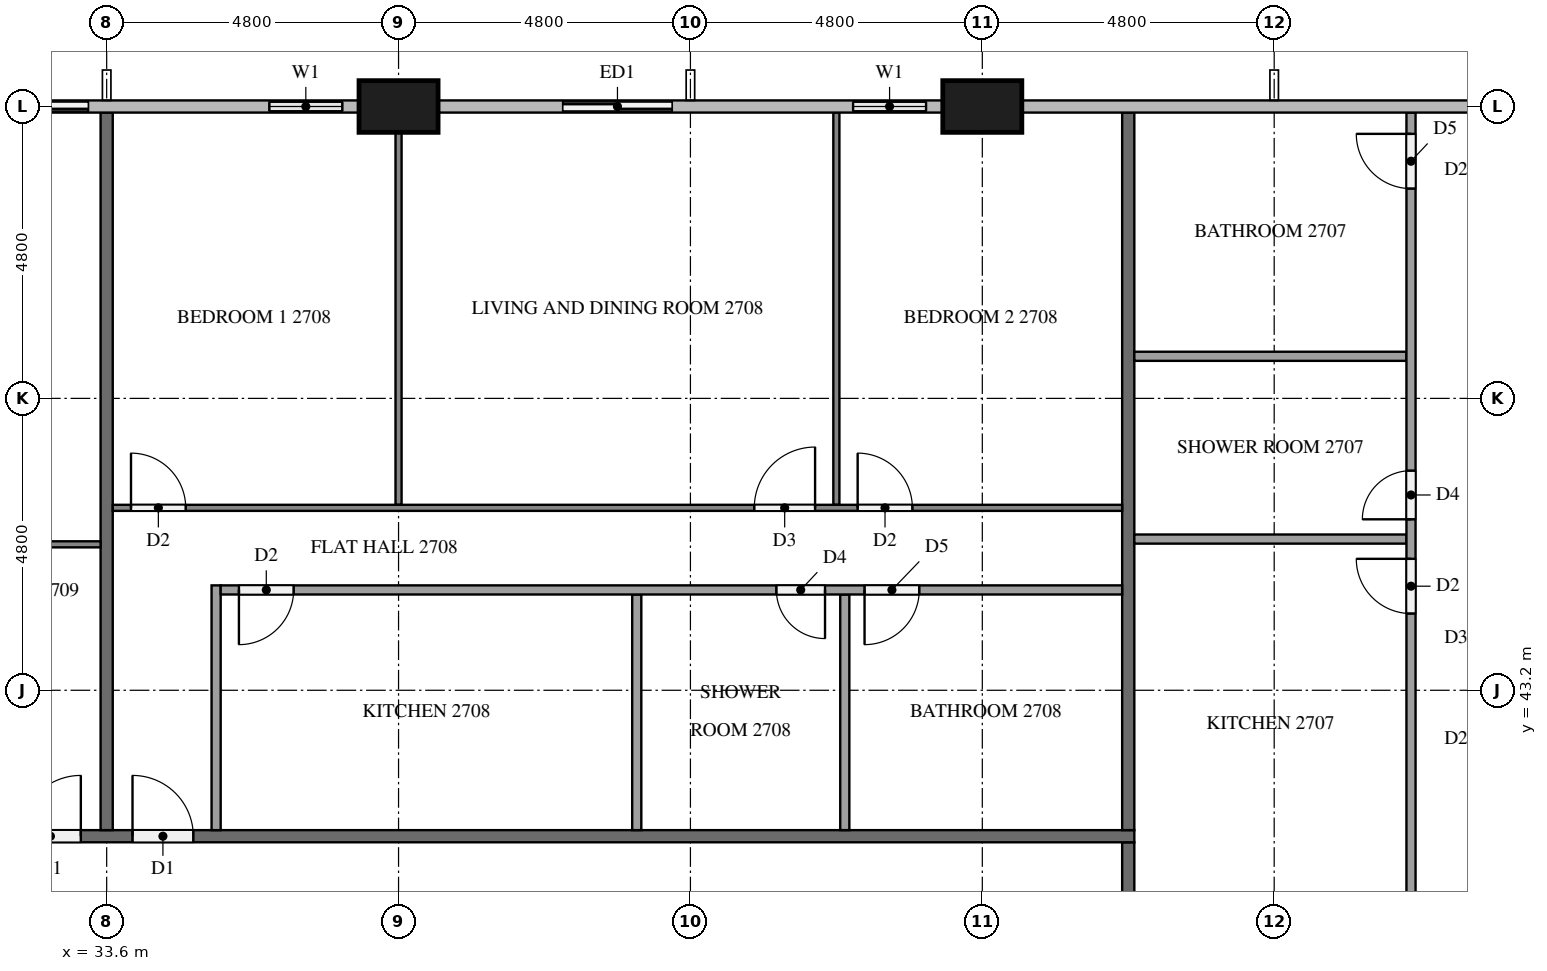
"""IFC4 building model, lengths in metres.
Left out: names, types, materials, properties, quantities, classifications, styles, units other than length and angle.
Written with IfcOpenShell. Run it as: python <this file> out.ifc"""

import sys

from ifc_helpers import new_model, si_unit, direction, frame, frame_2d, origin, origin_2d, place, context, subcontext, project, spatial, rectangle, extrude, element, fill, save


model = new_model("IFC4")
c1 = context("Model", 3, precision=1e-05, world=origin(), true_north=direction((0.0, 1.0)))
c2 = subcontext(c1, "Body", "Model", "MODEL_VIEW")
j1 = project(units=[si_unit("LENGTHUNIT", "METRE"), si_unit("PLANEANGLEUNIT", "RADIAN")], contexts=[c1])
p1 = place(None, origin())
s1 = spatial("IfcSite", under=j1, at=p1, CompositionType="ELEMENT")
p2 = place(p1, origin())
s2 = spatial("IfcBuilding", under=s1, at=p2, CompositionType="ELEMENT")
p3 = place(p2, frame((0.0, 0.0, 106.7)))
s3 = spatial("IfcBuildingStorey", under=s2, at=p3, CompositionType="ELEMENT", Elevation=106.7)
for number, where, z_axis, x_axis in (
    (1, (48.0, 52.8, 0.0), (0.0, 0.0, 1.0), (1.0, 0.0, 0.0)),
    (2, (38.4, 52.8, 0.0), (0.0, 0.0, 1.0), (1.0, 0.0, 0.0)),
):
    element("IfcColumn", number, at=place(p3, frame(where, z_axis=z_axis, x_axis=x_axis)), inside=s3, PredefinedType="COLUMN", context=c2, shape_type="SweptSolid", body=[
        extrude(rectangle(XDim=1.3, YDim=0.85, at=origin_2d()), origin(), (0.0, 0.0, 1.0), 3.2),
    ])
p4 = place(p3, frame((47.35, 52.8, 0.0), z_axis=(0.0, 0.0, 1.0), x_axis=(-1.0, 0.0, 0.0)))
e3 = element("IfcWall", 3, at=p4, inside=s3, PredefinedType="SOLIDWALL", context=c2, shape_type="SweptSolid", body=[
    extrude(rectangle(XDim=1.75, YDim=0.15, at=frame_2d((0.875, 0.0))), origin(), (0.0, 0.0, 1.0), 3.2),
])
p5 = place(p4, frame((0.275, 0.0, 0.9)))
e4 = element("IfcOpeningElement", 4, at=p5, cuts=e3, PredefinedType="OPENING", context=c2, shape_type="SweptSolid", body=[
    extrude(rectangle(XDim=1.2, YDim=1.4, at=frame_2d((0.6, 0.7))), frame((0.0, 0.085, 0.0), z_axis=(0.0, -1.0, 0.0), x_axis=(1.0, 0.0, 0.0)), (0.0, 0.0, 1.0), 0.17),
])
p6 = place(p3, frame((43.2, 52.8, 0.0), z_axis=(0.0, 0.0, 1.0), x_axis=(-1.0, 0.0, 0.0)))
e5 = element("IfcWall", 5, at=p6, inside=s3, PredefinedType="SOLIDWALL", context=c2, shape_type="SweptSolid", body=[
    extrude(rectangle(XDim=2.4, YDim=0.15, at=frame_2d((1.2, 0.0))), origin(), (0.0, 0.0, 1.0), 3.2),
])
p7 = place(p6, frame((0.3, 0.0, 0.0)))
e6 = element("IfcOpeningElement", 6, at=p7, cuts=e5, PredefinedType="OPENING", context=c2, shape_type="SweptSolid", body=[
    extrude(rectangle(XDim=1.8, YDim=2.4, at=frame_2d((0.9, 1.2))), frame((0.0, 0.085, 0.0), z_axis=(0.0, -1.0, 0.0), x_axis=(1.0, 0.0, 0.0)), (0.0, 0.0, 1.0), 0.17),
])
p8 = place(p3, frame((37.75, 52.8, 0.0), z_axis=(0.0, 0.0, 1.0), x_axis=(-1.0, 0.0, 0.0)))
e7 = element("IfcWall", 7, at=p8, inside=s3, PredefinedType="SOLIDWALL", context=c2, shape_type="SweptSolid", body=[
    extrude(rectangle(XDim=1.75, YDim=0.15, at=frame_2d((0.875, 0.0))), origin(), (0.0, 0.0, 1.0), 3.2),
])
p9 = place(p8, frame((0.275, 0.0, 0.9)))
e8 = element("IfcOpeningElement", 8, at=p9, cuts=e7, PredefinedType="OPENING", context=c2, shape_type="SweptSolid", body=[
    extrude(rectangle(XDim=1.2, YDim=1.4, at=frame_2d((0.6, 0.7))), frame((0.0, 0.085, 0.0), z_axis=(0.0, -1.0, 0.0), x_axis=(1.0, 0.0, 0.0)), (0.0, 0.0, 1.0), 0.17),
])
p10 = place(p3, frame((33.6, 52.8, 0.0), z_axis=(0.0, 0.0, 1.0), x_axis=(-1.0, 0.0, 0.0)))
e9 = element("IfcWall", 9, at=p10, inside=s3, PredefinedType="SOLIDWALL", context=c2, shape_type="SweptSolid", body=[
    extrude(rectangle(XDim=2.4, YDim=0.15, at=frame_2d((1.2, 0.0))), origin(), (0.0, 0.0, 1.0), 3.2),
])
p11 = place(p10, frame((0.3, 0.0, 0.0)))
e10 = element("IfcOpeningElement", 10, at=p11, cuts=e9, PredefinedType="OPENING", context=c2, shape_type="SweptSolid", body=[
    extrude(rectangle(XDim=1.8, YDim=2.4, at=frame_2d((0.9, 1.2))), frame((0.0, 0.085, 0.0), z_axis=(0.0, -1.0, 0.0), x_axis=(1.0, 0.0, 0.0)), (0.0, 0.0, 1.0), 0.17),
])
p12 = place(p3, frame((50.4, 40.7, 0.0), z_axis=(0.0, 0.0, 1.0), x_axis=(0.0, -1.0, 0.0)))
e11 = element("IfcWall", 11, at=p12, inside=s3, PredefinedType="PARTITIONING", context=c2, shape_type="SweptSolid", body=[
    extrude(rectangle(XDim=2.8, YDim=0.2, at=frame_2d((1.4, 0.0))), origin(), (0.0, 0.0, 1.0), 3.2),
])
p13 = place(p12, frame((1.475, 0.0, 0.0)))
e12 = element("IfcOpeningElement", 12, at=p13, cuts=e11, PredefinedType="OPENING", context=c2, shape_type="SweptSolid", body=[
    extrude(rectangle(XDim=1.0, YDim=2.1, at=frame_2d((0.5, 1.05))), frame((0.0, 0.11, 0.0), z_axis=(0.0, -1.0, 0.0), x_axis=(1.0, 0.0, 0.0)), (0.0, 0.0, 1.0), 0.22),
])
p14 = place(p3, frame((11.9, 40.8, 0.0), z_axis=(0.0, 0.0, 1.0), x_axis=(1.0, 0.0, 0.0)))
e13 = element("IfcWall", 13, at=p14, inside=s3, PredefinedType="PARTITIONING", context=c2, shape_type="SweptSolid", body=[
    extrude(rectangle(XDim=38.6, YDim=0.2, at=frame_2d((19.3, 0.0))), origin(), (0.0, 0.0, 1.0), 3.2),
])
p15 = place(p14, frame((22.125, 0.0, 0.0)))
e14 = element("IfcOpeningElement", 14, at=p15, cuts=e13, PredefinedType="OPENING", context=c2, shape_type="SweptSolid", body=[
    extrude(rectangle(XDim=1.0, YDim=2.1, at=frame_2d((0.5, 1.05))), frame((0.0, 0.11, 0.0), z_axis=(0.0, -1.0, 0.0), x_axis=(1.0, 0.0, 0.0)), (0.0, 0.0, 1.0), 0.22),
])
p16 = place(p14, frame((20.275, 0.0, 0.0)))
e15 = element("IfcOpeningElement", 15, at=p16, cuts=e13, PredefinedType="OPENING", context=c2, shape_type="SweptSolid", body=[
    extrude(rectangle(XDim=1.0, YDim=2.1, at=frame_2d((0.5, 1.05))), frame((0.0, 0.11, 0.0), z_axis=(0.0, -1.0, 0.0), x_axis=(1.0, 0.0, 0.0)), (0.0, 0.0, 1.0), 0.22),
])
p17 = place(p14, frame((0.525, 0.0, 0.0)))
e16 = element("IfcOpeningElement", 16, at=p17, cuts=e13, PredefinedType="OPENING", context=c2, shape_type="SweptSolid", body=[
    extrude(rectangle(XDim=1.0, YDim=2.1, at=frame_2d((0.5, 1.05))), frame((0.0, 0.11, 0.0), z_axis=(0.0, -1.0, 0.0), x_axis=(1.0, 0.0, 0.0)), (0.0, 0.0, 1.0), 0.22),
])
for number, where, z_axis, x_axis in (
    (17, (50.4, 40.9, 0.0), (0.0, 0.0, 1.0), (0.0, 1.0, 0.0)),
    (18, (33.6, 52.7, 0.0), (0.0, 0.0, 1.0), (0.0, -1.0, 0.0)),
):
    element("IfcWall", number, at=place(p3, frame(where, z_axis=z_axis, x_axis=x_axis)), inside=s3, PredefinedType="PARTITIONING", context=c2, shape_type="SweptSolid", body=[
        extrude(rectangle(XDim=11.8, YDim=0.2, at=frame_2d((5.9, 0.0))), origin(), (0.0, 0.0, 1.0), 3.2),
    ])
for number, where, z_axis, x_axis in (
    (19, (50.5, 45.687, 0.0), (0.0, 0.0, 1.0), (1.0, 0.0, 0.0)),
    (20, (50.5, 48.692, 0.0), (0.0, 0.0, 1.0), (1.0, 0.0, 0.0)),
):
    element("IfcWall", number, at=place(p3, frame(where, z_axis=z_axis, x_axis=x_axis)), inside=s3, PredefinedType="PARTITIONING", context=c2, shape_type="SweptSolid", body=[
        extrude(rectangle(XDim=4.475, YDim=0.15, at=frame_2d((2.238, 0.0))), origin(), (0.0, 0.0, 1.0), 3.2),
    ])
p18 = place(p3, frame((55.05, 39.675, 0.0), z_axis=(0.0, 0.0, 1.0), x_axis=(0.0, 1.0, 0.0)))
e21 = element("IfcWall", 21, at=p18, inside=s3, PredefinedType="PARTITIONING", context=c2, shape_type="SweptSolid", body=[
    extrude(rectangle(XDim=13.025, YDim=0.15, at=frame_2d((6.512, 0.0))), origin(), (0.0, 0.0, 1.0), 3.2),
])
p19 = place(p18, frame((4.787, 0.0, 0.0)))
e22 = element("IfcOpeningElement", 22, at=p19, cuts=e21, PredefinedType="OPENING", context=c2, shape_type="SweptSolid", body=[
    extrude(rectangle(XDim=0.9, YDim=2.1, at=frame_2d((0.45, 1.05))), frame((0.0, 0.085, 0.0), z_axis=(0.0, -1.0, 0.0), x_axis=(1.0, 0.0, 0.0)), (0.0, 0.0, 1.0), 0.17),
])
p20 = place(p18, frame((6.336, 0.0, 0.0)))
e23 = element("IfcOpeningElement", 23, at=p20, cuts=e21, PredefinedType="OPENING", context=c2, shape_type="SweptSolid", body=[
    extrude(rectangle(XDim=0.8, YDim=2.1, at=frame_2d((0.4, 1.05))), frame((0.0, 0.085, 0.0), z_axis=(0.0, -1.0, 0.0), x_axis=(1.0, 0.0, 0.0)), (0.0, 0.0, 1.0), 0.17),
])
p21 = place(p18, frame((11.775, 0.0, 0.0)))
e24 = element("IfcOpeningElement", 24, at=p21, cuts=e21, PredefinedType="OPENING", context=c2, shape_type="SweptSolid", body=[
    extrude(rectangle(XDim=0.9, YDim=2.1, at=frame_2d((0.45, 1.05))), frame((0.0, 0.085, 0.0), z_axis=(0.0, -1.0, 0.0), x_axis=(1.0, 0.0, 0.0)), (0.0, 0.0, 1.0), 0.17),
])
p22 = place(p3, frame((38.4, 46.25, 0.0), z_axis=(0.0, 0.0, 1.0), x_axis=(0.0, 1.0, 0.0)))
e25 = element("IfcWall", 25, at=p22, inside=s3, PredefinedType="PARTITIONING", context=c2, shape_type="SweptSolid", body=[
    extrude(rectangle(XDim=6.125, YDim=0.1, at=frame_2d((3.062, 0.0))), origin(), (0.0, 0.0, 1.0), 3.2),
])
p23 = place(p3, frame((45.6, 46.25, 0.0), z_axis=(0.0, 0.0, 1.0), x_axis=(0.0, 1.0, 0.0)))
e26 = element("IfcWall", 26, at=p23, inside=s3, PredefinedType="PARTITIONING", context=c2, shape_type="SweptSolid", body=[
    extrude(rectangle(XDim=6.45, YDim=0.1, at=frame_2d((3.225, 0.0))), origin(), (0.0, 0.0, 1.0), 3.2),
])
p24 = place(p3, frame((33.7, 46.2, 0.0), z_axis=(0.0, 0.0, 1.0), x_axis=(1.0, 0.0, 0.0)))
e27 = element("IfcWall", 27, at=p24, inside=s3, PredefinedType="PARTITIONING", context=c2, shape_type="SweptSolid", body=[
    extrude(rectangle(XDim=16.6, YDim=0.1, at=frame_2d((8.3, 0.0))), origin(), (0.0, 0.0, 1.0), 3.2),
])
p25 = place(p24, frame((0.3, 0.0, 0.0)))
e28 = element("IfcOpeningElement", 28, at=p25, cuts=e27, PredefinedType="OPENING", context=c2, shape_type="SweptSolid", body=[
    extrude(rectangle(XDim=0.9, YDim=2.1, at=frame_2d((0.45, 1.05))), frame((0.0, 0.06, 0.0), z_axis=(0.0, -1.0, 0.0), x_axis=(1.0, 0.0, 0.0)), (0.0, 0.0, 1.0), 0.12),
])
p26 = place(p24, frame((10.55, 0.0, 0.0)))
e29 = element("IfcOpeningElement", 29, at=p26, cuts=e27, PredefinedType="OPENING", context=c2, shape_type="SweptSolid", body=[
    extrude(rectangle(XDim=1.0, YDim=2.1, at=frame_2d((0.5, 1.05))), frame((0.0, 0.06, 0.0), z_axis=(0.0, -1.0, 0.0), x_axis=(1.0, 0.0, 0.0)), (0.0, 0.0, 1.0), 0.12),
])
p27 = place(p24, frame((12.25, 0.0, 0.0)))
e30 = element("IfcOpeningElement", 30, at=p27, cuts=e27, PredefinedType="OPENING", context=c2, shape_type="SweptSolid", body=[
    extrude(rectangle(XDim=0.9, YDim=2.1, at=frame_2d((0.45, 1.05))), frame((0.0, 0.06, 0.0), z_axis=(0.0, -1.0, 0.0), x_axis=(1.0, 0.0, 0.0)), (0.0, 0.0, 1.0), 0.12),
])
for number, where, z_axis, x_axis in (
    (31, (42.317, 40.9, 0.0), (0.0, 0.0, 1.0), (0.0, 1.0, 0.0)),
    (32, (45.739, 40.9, 0.0), (0.0, 0.0, 1.0), (0.0, 1.0, 0.0)),
):
    element("IfcWall", number, at=place(p3, frame(where, z_axis=z_axis, x_axis=x_axis)), inside=s3, PredefinedType="PARTITIONING", context=c2, shape_type="SweptSolid", body=[
        extrude(rectangle(XDim=3.875, YDim=0.15, at=frame_2d((1.938, 0.0))), origin(), (0.0, 0.0, 1.0), 3.2),
    ])
p28 = place(p3, frame((35.4, 40.9, 0.0), z_axis=(0.0, 0.0, 1.0), x_axis=(0.0, 1.0, 0.0)))
e33 = element("IfcWall", 33, at=p28, inside=s3, PredefinedType="PARTITIONING", context=c2, shape_type="SweptSolid", body=[
    extrude(rectangle(XDim=4.025, YDim=0.15, at=frame_2d((2.013, 0.0))), origin(), (0.0, 0.0, 1.0), 3.2),
])
p29 = place(p3, frame((50.3, 44.85, 0.0), z_axis=(0.0, 0.0, 1.0), x_axis=(-1.0, 0.0, 0.0)))
e34 = element("IfcWall", 34, at=p29, inside=s3, PredefinedType="PARTITIONING", context=c2, shape_type="SweptSolid", body=[
    extrude(rectangle(XDim=14.825, YDim=0.15, at=frame_2d((7.413, 0.0))), origin(), (0.0, 0.0, 1.0), 3.2),
])
p30 = place(p29, frame((13.625, 0.0, 0.0)))
e35 = element("IfcOpeningElement", 35, at=p30, cuts=e34, PredefinedType="OPENING", context=c2, shape_type="SweptSolid", body=[
    extrude(rectangle(XDim=0.9, YDim=2.1, at=frame_2d((0.45, 1.05))), frame((0.0, 0.085, 0.0), z_axis=(0.0, -1.0, 0.0), x_axis=(1.0, 0.0, 0.0)), (0.0, 0.0, 1.0), 0.17),
])
p31 = place(p29, frame((4.886, 0.0, 0.0)))
e36 = element("IfcOpeningElement", 36, at=p31, cuts=e34, PredefinedType="OPENING", context=c2, shape_type="SweptSolid", body=[
    extrude(rectangle(XDim=0.8, YDim=2.1, at=frame_2d((0.4, 1.05))), frame((0.0, 0.085, 0.0), z_axis=(0.0, -1.0, 0.0), x_axis=(1.0, 0.0, 0.0)), (0.0, 0.0, 1.0), 0.17),
])
p32 = place(p29, frame((3.336, 0.0, 0.0)))
e37 = element("IfcOpeningElement", 37, at=p32, cuts=e34, PredefinedType="OPENING", context=c2, shape_type="SweptSolid", body=[
    extrude(rectangle(XDim=0.9, YDim=2.1, at=frame_2d((0.45, 1.05))), frame((0.0, 0.085, 0.0), z_axis=(0.0, -1.0, 0.0), x_axis=(1.0, 0.0, 0.0)), (0.0, 0.0, 1.0), 0.17),
])
p33 = place(p3, frame((21.7, 45.6, 0.0), z_axis=(0.0, 0.0, 1.0), x_axis=(1.0, 0.0, 0.0)))
e38 = element("IfcWall", 38, at=p33, inside=s3, PredefinedType="PARTITIONING", context=c2, shape_type="SweptSolid", body=[
    extrude(rectangle(XDim=11.8, YDim=0.1, at=frame_2d((5.9, 0.0))), origin(), (0.0, 0.0, 1.0), 3.2),
])
p34 = place(p33, frame((5.05, 0.0, 0.0)))
e39 = element("IfcOpeningElement", 39, at=p34, cuts=e38, PredefinedType="OPENING", context=c2, shape_type="SweptSolid", body=[
    extrude(rectangle(XDim=1.0, YDim=2.1, at=frame_2d((0.5, 1.05))), frame((0.0, 0.06, 0.0), z_axis=(0.0, -1.0, 0.0), x_axis=(1.0, 0.0, 0.0)), (0.0, 0.0, 1.0), 0.12),
])
p35 = place(p33, frame((3.45, 0.0, 0.0)))
e40 = element("IfcOpeningElement", 40, at=p35, cuts=e38, PredefinedType="OPENING", context=c2, shape_type="SweptSolid", body=[
    extrude(rectangle(XDim=0.9, YDim=2.1, at=frame_2d((0.45, 1.05))), frame((0.0, 0.06, 0.0), z_axis=(0.0, -1.0, 0.0), x_axis=(1.0, 0.0, 0.0)), (0.0, 0.0, 1.0), 0.12),
])
p36 = place(p5, origin())
e41 = element("IfcWindow", 41, at=p36, inside=s3, PartitioningType="SINGLE_PANEL", PredefinedType="WINDOW", context=c2, shape_type="SweptSolid", body=[
    extrude(rectangle(XDim=1.2, YDim=1.4, at=frame_2d((0.6, 0.7))), frame((0.0, 0.03, 0.0), z_axis=(0.0, -1.0, 0.0), x_axis=(1.0, 0.0, 0.0)), (0.0, 0.0, 1.0), 0.06),
])
fill(e4, e41)
p37 = place(p7, origin())
e42 = element("IfcDoor", 42, at=p37, inside=s3, OperationType="SLIDING_TO_RIGHT", PredefinedType="DOOR", context=c2, shape_type="SweptSolid", body=[
    extrude(rectangle(XDim=1.8, YDim=2.4, at=frame_2d((0.9, 1.2))), frame((0.0, 0.025, 0.0), z_axis=(0.0, -1.0, 0.0), x_axis=(1.0, 0.0, 0.0)), (0.0, 0.0, 1.0), 0.05),
])
fill(e6, e42)
p38 = place(p9, origin())
e43 = element("IfcWindow", 43, at=p38, inside=s3, PartitioningType="SINGLE_PANEL", PredefinedType="WINDOW", context=c2, shape_type="SweptSolid", body=[
    extrude(rectangle(XDim=1.2, YDim=1.4, at=frame_2d((0.6, 0.7))), frame((0.0, 0.03, 0.0), z_axis=(0.0, -1.0, 0.0), x_axis=(1.0, 0.0, 0.0)), (0.0, 0.0, 1.0), 0.06),
])
fill(e8, e43)
p39 = place(p11, origin())
e44 = element("IfcDoor", 44, at=p39, inside=s3, OperationType="SLIDING_TO_LEFT", PredefinedType="DOOR", context=c2, shape_type="SweptSolid", body=[
    extrude(rectangle(XDim=1.8, YDim=2.4, at=frame_2d((0.9, 1.2))), frame((0.0, 0.025, 0.0), z_axis=(0.0, -1.0, 0.0), x_axis=(1.0, 0.0, 0.0)), (0.0, 0.0, 1.0), 0.05),
])
fill(e10, e44)
p40 = place(p15, origin())
e45 = element("IfcDoor", 45, at=p40, inside=s3, OperationType="SINGLE_SWING_LEFT", PredefinedType="DOOR", context=c2, shape_type="SweptSolid", body=[
    extrude(rectangle(XDim=1.0, YDim=2.1, at=frame_2d((0.5, 1.05))), frame((0.0, 0.025, 0.0), z_axis=(0.0, -1.0, 0.0), x_axis=(1.0, 0.0, 0.0)), (0.0, 0.0, 1.0), 0.05),
])
fill(e14, e45)
p41 = place(p16, origin())
e46 = element("IfcDoor", 46, at=p41, inside=s3, OperationType="SINGLE_SWING_RIGHT", PredefinedType="DOOR", context=c2, shape_type="SweptSolid", body=[
    extrude(rectangle(XDim=1.0, YDim=2.1, at=frame_2d((0.5, 1.05))), frame((0.0, 0.025, 0.0), z_axis=(0.0, -1.0, 0.0), x_axis=(1.0, 0.0, 0.0)), (0.0, 0.0, 1.0), 0.05),
])
fill(e15, e46)
p42 = place(p19, origin())
e47 = element("IfcDoor", 47, at=p42, inside=s3, OperationType="SINGLE_SWING_RIGHT", PredefinedType="DOOR", context=c2, shape_type="SweptSolid", body=[
    extrude(rectangle(XDim=0.9, YDim=2.1, at=frame_2d((0.45, 1.05))), frame((0.0, 0.025, 0.0), z_axis=(0.0, -1.0, 0.0), x_axis=(1.0, 0.0, 0.0)), (0.0, 0.0, 1.0), 0.05),
])
fill(e22, e47)
p43 = place(p20, origin())
e48 = element("IfcDoor", 48, at=p43, inside=s3, OperationType="SINGLE_SWING_LEFT", PredefinedType="DOOR", context=c2, shape_type="SweptSolid", body=[
    extrude(rectangle(XDim=0.8, YDim=2.1, at=frame_2d((0.4, 1.05))), frame((0.0, 0.025, 0.0), z_axis=(0.0, -1.0, 0.0), x_axis=(1.0, 0.0, 0.0)), (0.0, 0.0, 1.0), 0.05),
])
fill(e23, e48)
p44 = place(p21, origin())
e49 = element("IfcDoor", 49, at=p44, inside=s3, OperationType="SINGLE_SWING_RIGHT", PredefinedType="DOOR", context=c2, shape_type="SweptSolid", body=[
    extrude(rectangle(XDim=0.9, YDim=2.1, at=frame_2d((0.45, 1.05))), frame((0.0, 0.025, 0.0), z_axis=(0.0, -1.0, 0.0), x_axis=(1.0, 0.0, 0.0)), (0.0, 0.0, 1.0), 0.05),
])
fill(e24, e49)
p45 = place(p25, origin())
e50 = element("IfcDoor", 50, at=p45, inside=s3, OperationType="SINGLE_SWING_LEFT", PredefinedType="DOOR", context=c2, shape_type="SweptSolid", body=[
    extrude(rectangle(XDim=0.9, YDim=2.1, at=frame_2d((0.45, 1.05))), frame((0.0, 0.025, 0.0), z_axis=(0.0, -1.0, 0.0), x_axis=(1.0, 0.0, 0.0)), (0.0, 0.0, 1.0), 0.05),
])
fill(e28, e50)
p46 = place(p26, origin())
e51 = element("IfcDoor", 51, at=p46, inside=s3, OperationType="SINGLE_SWING_RIGHT", PredefinedType="DOOR", context=c2, shape_type="SweptSolid", body=[
    extrude(rectangle(XDim=1.0, YDim=2.1, at=frame_2d((0.5, 1.05))), frame((0.0, 0.025, 0.0), z_axis=(0.0, -1.0, 0.0), x_axis=(1.0, 0.0, 0.0)), (0.0, 0.0, 1.0), 0.05),
])
fill(e29, e51)
p47 = place(p27, origin())
e52 = element("IfcDoor", 52, at=p47, inside=s3, OperationType="SINGLE_SWING_LEFT", PredefinedType="DOOR", context=c2, shape_type="SweptSolid", body=[
    extrude(rectangle(XDim=0.9, YDim=2.1, at=frame_2d((0.45, 1.05))), frame((0.0, 0.025, 0.0), z_axis=(0.0, -1.0, 0.0), x_axis=(1.0, 0.0, 0.0)), (0.0, 0.0, 1.0), 0.05),
])
fill(e30, e52)
p48 = place(p30, origin())
e53 = element("IfcDoor", 53, at=p48, inside=s3, OperationType="SINGLE_SWING_RIGHT", PredefinedType="DOOR", context=c2, shape_type="SweptSolid", body=[
    extrude(rectangle(XDim=0.9, YDim=2.1, at=frame_2d((0.45, 1.05))), frame((0.0, 0.025, 0.0), z_axis=(0.0, -1.0, 0.0), x_axis=(1.0, 0.0, 0.0)), (0.0, 0.0, 1.0), 0.05),
])
fill(e35, e53)
p49 = place(p31, origin())
e54 = element("IfcDoor", 54, at=p49, inside=s3, OperationType="SINGLE_SWING_LEFT", PredefinedType="DOOR", context=c2, shape_type="SweptSolid", body=[
    extrude(rectangle(XDim=0.8, YDim=2.1, at=frame_2d((0.4, 1.05))), frame((0.0, 0.025, 0.0), z_axis=(0.0, -1.0, 0.0), x_axis=(1.0, 0.0, 0.0)), (0.0, 0.0, 1.0), 0.05),
])
fill(e36, e54)
p50 = place(p32, origin())
e55 = element("IfcDoor", 55, at=p50, inside=s3, OperationType="SINGLE_SWING_RIGHT", PredefinedType="DOOR", context=c2, shape_type="SweptSolid", body=[
    extrude(rectangle(XDim=0.9, YDim=2.1, at=frame_2d((0.45, 1.05))), frame((0.0, 0.025, 0.0), z_axis=(0.0, -1.0, 0.0), x_axis=(1.0, 0.0, 0.0)), (0.0, 0.0, 1.0), 0.05),
])
fill(e37, e55)
save(model, sys.argv[1])
